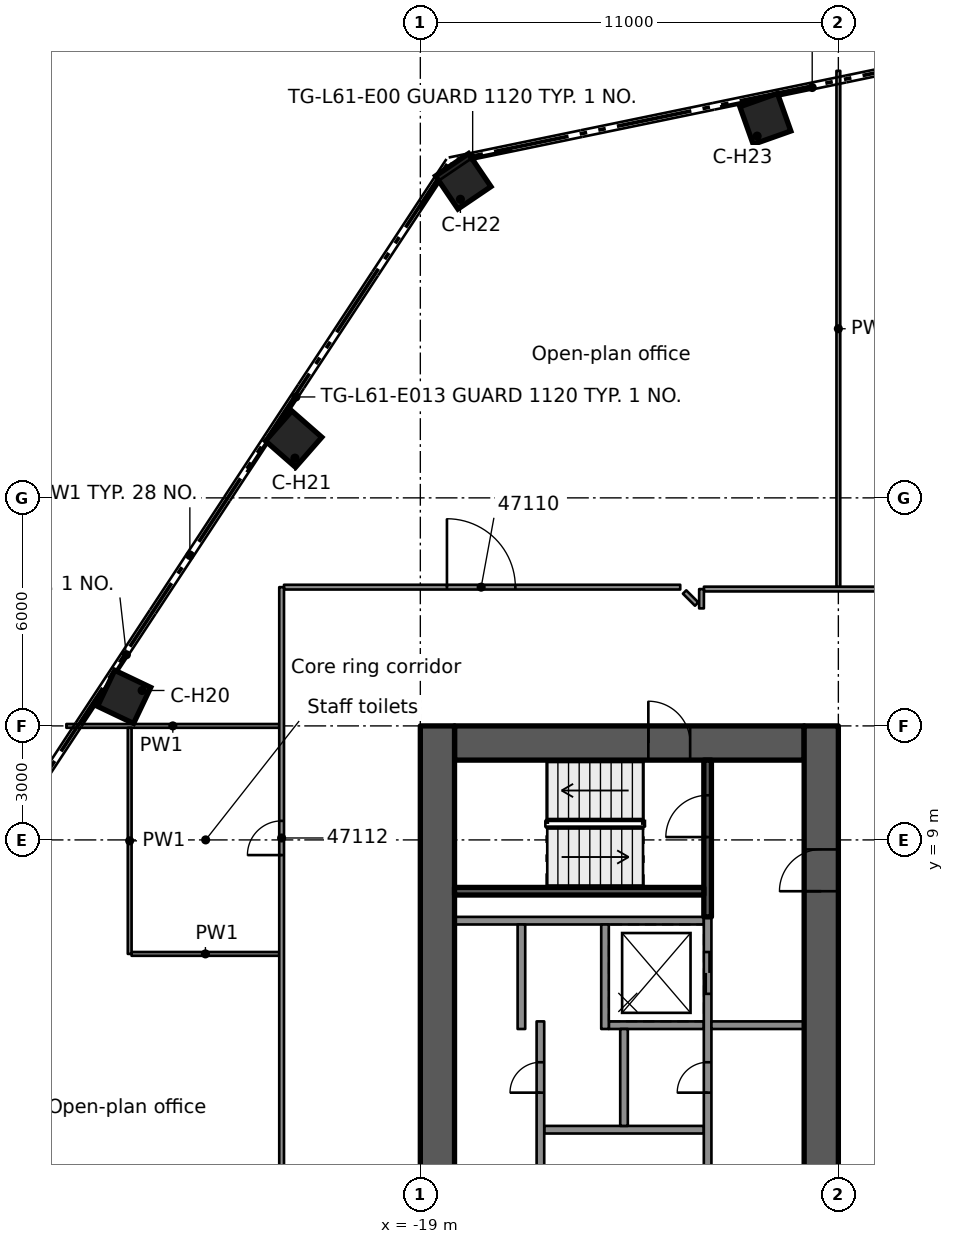
"""IFC4 building model, lengths in metres.
Left out: names, types, materials, properties, quantities, classifications, styles, units other than length and angle.
Written with IfcOpenShell. Run it as: python <this file> out.ifc"""

import sys

from ifc_helpers import new_model, si_unit, direction, frame, frame_2d, origin, origin_2d, place, context, subcontext, project, spatial, rectangle, extrude, element, fill, save


model = new_model("IFC4")
c1 = context("Model", 3, precision=1e-05, world=origin(), true_north=direction((0.0, 1.0)))
c2 = subcontext(c1, "Body", "Model", "MODEL_VIEW")
j1 = project(units=[si_unit("LENGTHUNIT", "METRE"), si_unit("PLANEANGLEUNIT", "RADIAN")], contexts=[c1])
p1 = place(None, origin())
s1 = spatial("IfcSite", under=j1, at=p1, CompositionType="ELEMENT")
p2 = place(p1, origin())
s2 = spatial("IfcBuilding", under=s1, at=p2, CompositionType="ELEMENT")
p3 = place(p2, frame((0.0, 0.0, 232.0)))
s3 = spatial("IfcBuildingStorey", under=s2, at=p3, CompositionType="ELEMENT", Elevation=232.0)
p4 = place(p3, frame((-18.1, 11.55, 0.0), z_axis=(0.0, 0.0, 1.0), x_axis=(1.0, 0.0, 0.0)))
e1 = element("IfcWall", 1, at=p4, inside=s3, PredefinedType="SHEAR", context=c2, shape_type="SweptSolid", body=[
    extrude(rectangle(XDim=9.2, YDim=0.9, at=frame_2d((4.6, 0.0))), origin(), (0.0, 0.0, 1.0), 3.5),
])
p5 = place(p4, frame((5.1, 0.0, 0.0)))
e2 = element("IfcOpeningElement", 2, at=p5, cuts=e1, PredefinedType="OPENING", context=c2, shape_type="SweptSolid", body=[
    extrude(rectangle(XDim=1.1, YDim=2.1, at=frame_2d((0.55, 1.05))), frame((0.0, 0.46, 0.0), z_axis=(0.0, -1.0, 0.0), x_axis=(1.0, 0.0, 0.0)), (0.0, 0.0, 1.0), 0.92),
])
p6 = place(p3, frame((-18.55, -12.0, 0.0), z_axis=(0.0, 0.0, 1.0), x_axis=(0.0, 1.0, 0.0)))
e3 = element("IfcWall", 3, at=p6, inside=s3, PredefinedType="SHEAR", context=c2, shape_type="SweptSolid", body=[
    extrude(rectangle(XDim=24.0, YDim=0.9, at=frame_2d((12.0, 0.0))), origin(), (0.0, 0.0, 1.0), 3.5),
])
p7 = place(p6, frame((10.1, 0.0, 0.0)))
e4 = element("IfcOpeningElement", 4, at=p7, cuts=e3, PredefinedType="OPENING", context=c2, shape_type="SweptSolid", body=[
    extrude(rectangle(XDim=1.8, YDim=2.1, at=frame_2d((0.9, 1.05))), frame((0.0, 0.46, 0.0), z_axis=(0.0, -1.0, 0.0), x_axis=(1.0, 0.0, 0.0)), (0.0, 0.0, 1.0), 0.92),
])
p8 = place(p3, frame((-8.45, -12.0, 0.0), z_axis=(0.0, 0.0, 1.0), x_axis=(0.0, 1.0, 0.0)))
e5 = element("IfcWall", 5, at=p8, inside=s3, PredefinedType="SHEAR", context=c2, shape_type="SweptSolid", body=[
    extrude(rectangle(XDim=24.0, YDim=0.9, at=frame_2d((12.0, 0.0))), origin(), (0.0, 0.0, 1.0), 3.5),
])
p9 = place(p8, frame((9.6, 0.0, 0.0)))
e6 = element("IfcOpeningElement", 6, at=p9, cuts=e5, PredefinedType="OPENING", context=c2, shape_type="SweptSolid", body=[
    extrude(rectangle(XDim=1.8, YDim=2.1, at=frame_2d((0.9, 1.05))), frame((0.0, 0.46, 0.0), z_axis=(0.0, -1.0, 0.0), x_axis=(1.0, 0.0, 0.0)), (0.0, 0.0, 1.0), 0.92),
])
p10 = place(p8, frame((19.65, 0.0, 0.0)))
e7 = element("IfcOpeningElement", 7, at=p10, cuts=e5, PredefinedType="OPENING", context=c2, shape_type="SweptSolid", body=[
    extrude(rectangle(XDim=1.1, YDim=2.1, at=frame_2d((0.55, 1.05))), frame((0.0, 0.46, 0.0), z_axis=(0.0, -1.0, 0.0), x_axis=(1.0, 0.0, 0.0)), (0.0, 0.0, 1.0), 0.92),
])
p11 = place(p8, frame((2.2, 0.0, 0.0)))
e8 = element("IfcOpeningElement", 8, at=p11, cuts=e5, PredefinedType="OPENING", context=c2, shape_type="SweptSolid", body=[
    extrude(rectangle(XDim=0.8, YDim=2.1, at=frame_2d((0.4, 1.05))), frame((0.0, 0.46, 0.0), z_axis=(0.0, -1.0, 0.0), x_axis=(1.0, 0.0, 0.0)), (0.0, 0.0, 1.0), 0.92),
])
for number, where, z_axis, x_axis in (
    (9, (-26.794, 12.764, 0.0), (0.0, 0.0, 1.0), (-0.903, 0.43, 0.0)),
    (10, (-22.333, 19.547, 0.0), (0.0, 0.0, 1.0), (-0.752, 0.659, 0.0)),
    (11, (-17.871, 26.33, 0.0), (0.0, 0.0, 1.0), (-0.562, 0.827, 0.0)),
    (12, (-9.921, 27.972, 0.0), (0.0, 0.0, 1.0), (-0.334, 0.942, 0.0)),
):
    element("IfcColumn", number, at=place(p3, frame(where, z_axis=z_axis, x_axis=x_axis)), inside=s3, PredefinedType="COLUMN", context=c2, shape_type="SweptSolid", body=[
        extrude(rectangle(XDim=1.05, YDim=1.05, at=origin_2d()), origin(), (0.0, 0.0, 1.0), 3.5),
    ])
p12 = place(p3, frame((-11.54, 6.875, 0.0), z_axis=(0.0, 0.0, 1.0), x_axis=(-1.0, 0.0, 0.0)))
e13 = element("IfcWall", 13, at=p12, inside=s3, PredefinedType="SOLIDWALL", context=c2, shape_type="SweptSolid", body=[
    extrude(rectangle(XDim=6.56, YDim=0.2, at=frame_2d((3.28, 0.0))), origin(), (0.0, 0.0, 1.0), 3.09),
])
p13 = place(p3, frame((-11.54, 1.375, 0.0), z_axis=(0.0, 0.0, 1.0), x_axis=(-1.0, 0.0, 0.0)))
e14 = element("IfcWall", 14, at=p13, inside=s3, PredefinedType="SOLIDWALL", context=c2, shape_type="SweptSolid", body=[
    extrude(rectangle(XDim=4.2, YDim=0.2, at=frame_2d((2.1, 0.0))), origin(), (0.0, 0.0, 1.0), 3.09),
])
p14 = place(p3, frame((-11.54, 4.125, 0.0), z_axis=(0.0, 0.0, 1.0), x_axis=(-1.0, 0.0, 0.0)))
e15 = element("IfcWall", 15, at=p14, inside=s3, PredefinedType="SOLIDWALL", context=c2, shape_type="SweptSolid", body=[
    extrude(rectangle(XDim=2.5, YDim=0.2, at=frame_2d((1.25, 0.0))), origin(), (0.0, 0.0, 1.0), 3.09),
])
p15 = place(p3, frame((-11.44, -6.975, 0.0), z_axis=(0.0, 0.0, 1.0), x_axis=(0.0, 1.0, 0.0)))
e16 = element("IfcWall", 16, at=p15, inside=s3, PredefinedType="SOLIDWALL", context=c2, shape_type="SweptSolid", body=[
    extrude(rectangle(XDim=13.95, YDim=0.2, at=frame_2d((6.975, 0.0))), origin(), (0.0, 0.0, 1.0), 3.09),
])
p16 = place(p15, frame((0.925, 0.0, 0.0)))
e17 = element("IfcOpeningElement", 17, at=p16, cuts=e16, PredefinedType="OPENING", context=c2, shape_type="SweptSolid", body=[
    extrude(rectangle(XDim=1.1, YDim=2.1, at=frame_2d((0.55, 1.05))), frame((0.0, 0.11, 0.0), z_axis=(0.0, -1.0, 0.0), x_axis=(1.0, 0.0, 0.0)), (0.0, 0.0, 1.0), 0.22),
])
p17 = place(p15, frame((3.675, 0.0, 0.0)))
e18 = element("IfcOpeningElement", 18, at=p17, cuts=e16, PredefinedType="OPENING", context=c2, shape_type="SweptSolid", body=[
    extrude(rectangle(XDim=1.1, YDim=2.1, at=frame_2d((0.55, 1.05))), frame((0.0, 0.11, 0.0), z_axis=(0.0, -1.0, 0.0), x_axis=(1.0, 0.0, 0.0)), (0.0, 0.0, 1.0), 0.22),
])
p18 = place(p15, frame((11.925, 0.0, 0.0)))
e19 = element("IfcOpeningElement", 19, at=p18, cuts=e16, PredefinedType="OPENING", context=c2, shape_type="SweptSolid", body=[
    extrude(rectangle(XDim=1.1, YDim=2.1, at=frame_2d((0.55, 1.05))), frame((0.0, 0.11, 0.0), z_axis=(0.0, -1.0, 0.0), x_axis=(1.0, 0.0, 0.0)), (0.0, 0.0, 1.0), 0.22),
])
p19 = place(p15, frame((6.575, 0.0, 0.0)))
e20 = element("IfcOpeningElement", 20, at=p19, cuts=e16, PredefinedType="OPENING", context=c2, shape_type="SweptSolid", body=[
    extrude(rectangle(XDim=0.8, YDim=2.1, at=frame_2d((0.4, 1.05))), frame((0.0, 0.11, 0.0), z_axis=(0.0, -1.0, 0.0), x_axis=(1.0, 0.0, 0.0)), (0.0, 0.0, 1.0), 0.22),
])
p20 = place(p15, frame((9.325, 0.0, 0.0)))
e21 = element("IfcOpeningElement", 21, at=p20, cuts=e16, PredefinedType="OPENING", context=c2, shape_type="SweptSolid", body=[
    extrude(rectangle(XDim=0.8, YDim=2.1, at=frame_2d((0.4, 1.05))), frame((0.0, 0.11, 0.0), z_axis=(0.0, -1.0, 0.0), x_axis=(1.0, 0.0, 0.0)), (0.0, 0.0, 1.0), 0.22),
])
p21 = place(p3, frame((-13.64, 1.475, 0.0), z_axis=(0.0, 0.0, 1.0), x_axis=(0.0, 1.0, 0.0)))
e22 = element("IfcWall", 22, at=p21, inside=s3, PredefinedType="SOLIDWALL", context=c2, shape_type="SweptSolid", body=[
    extrude(rectangle(XDim=2.55, YDim=0.2, at=frame_2d((1.275, 0.0))), origin(), (0.0, 0.0, 1.0), 3.09),
])
p22 = place(p3, frame((-14.14, 4.025, 0.0), z_axis=(0.0, 0.0, 1.0), x_axis=(0.0, 1.0, 0.0)))
e23 = element("IfcWall", 23, at=p22, inside=s3, PredefinedType="SOLIDWALL", context=c2, shape_type="SweptSolid", body=[
    extrude(rectangle(XDim=2.75, YDim=0.2, at=frame_2d((1.375, 0.0))), origin(), (0.0, 0.0, 1.0), 3.09),
])
p23 = place(p3, frame((-15.84, -4.025, 0.0), z_axis=(0.0, 0.0, 1.0), x_axis=(0.0, 1.0, 0.0)))
e24 = element("IfcWall", 24, at=p23, inside=s3, PredefinedType="SOLIDWALL", context=c2, shape_type="SweptSolid", body=[
    extrude(rectangle(XDim=8.25, YDim=0.2, at=frame_2d((4.125, 0.0))), origin(), (0.0, 0.0, 1.0), 3.09),
])
p24 = place(p23, frame((6.375, 0.0, 0.0)))
e25 = element("IfcOpeningElement", 25, at=p24, cuts=e24, PredefinedType="OPENING", context=c2, shape_type="SweptSolid", body=[
    extrude(rectangle(XDim=0.8, YDim=2.1, at=frame_2d((0.4, 1.05))), frame((0.0, 0.11, 0.0), z_axis=(0.0, -1.0, 0.0), x_axis=(1.0, 0.0, 0.0)), (0.0, 0.0, 1.0), 0.22),
])
p25 = place(p3, frame((-16.34, 4.025, 0.0), z_axis=(0.0, 0.0, 1.0), x_axis=(0.0, 1.0, 0.0)))
e26 = element("IfcWall", 26, at=p25, inside=s3, PredefinedType="SOLIDWALL", context=c2, shape_type="SweptSolid", body=[
    extrude(rectangle(XDim=2.75, YDim=0.2, at=frame_2d((1.375, 0.0))), origin(), (0.0, 0.0, 1.0), 3.09),
])
p26 = place(p3, frame((-11.44, 6.975, 0.0), z_axis=(0.0, 0.0, 1.0), x_axis=(0.0, 1.0, 0.0)))
e27 = element("IfcWall", 27, at=p26, inside=s3, PredefinedType="SOLIDWALL", context=c2, shape_type="SweptSolid", body=[
    extrude(rectangle(XDim=4.125, YDim=0.2, at=frame_2d((2.062, 0.0))), origin(), (0.0, 0.0, 1.0), 3.09),
])
p27 = place(p26, frame((2.1, 0.0, 0.0)))
e28 = element("IfcOpeningElement", 28, at=p27, cuts=e27, PredefinedType="OPENING", context=c2, shape_type="SweptSolid", body=[
    extrude(rectangle(XDim=1.1, YDim=2.1, at=frame_2d((0.55, 1.05))), frame((0.0, 0.11, 0.0), z_axis=(0.0, -1.0, 0.0), x_axis=(1.0, 0.0, 0.0)), (0.0, 0.0, 1.0), 0.22),
])
p28 = place(p3, frame((-11.54, 7.65, 0.0), z_axis=(0.0, 0.0, 1.0), x_axis=(-1.0, 0.0, 0.0)))
e29 = element("IfcWall", 29, at=p28, inside=s3, PredefinedType="SOLIDWALL", context=c2, shape_type="SweptSolid", body=[
    extrude(rectangle(XDim=6.56, YDim=0.2, at=frame_2d((3.28, 0.0))), origin(), (0.0, 0.0, 1.0), 3.09),
])
p29 = place(p3, frame((-8.9, 4.125, 0.0), z_axis=(0.0, 0.0, 1.0), x_axis=(-1.0, 0.0, 0.0)))
e30 = element("IfcWall", 30, at=p29, inside=s3, PredefinedType="PARTITIONING", context=c2, shape_type="SweptSolid", body=[
    extrude(rectangle(XDim=2.44, YDim=0.2, at=frame_2d((1.22, 0.0))), origin(), (0.0, 0.0, 1.0), 3.09),
])
p30 = place(p3, frame((-12.046, 15.523, 0.0), z_axis=(0.0, 0.0, 1.0), x_axis=(0.707106781187, -0.707106781187, 0.0)))
e31 = element("IfcWall", 31, at=p30, inside=s3, PredefinedType="PARTITIONING", context=c2, shape_type="SweptSolid", body=[
    extrude(rectangle(XDim=0.448, YDim=0.125, at=frame_2d((0.224, 0.0))), origin(), (0.0, 0.0, 1.0), 3.08),
])
p31 = place(p3, frame((-26.598, 6.001, 0.0), z_axis=(0.0, 0.0, 1.0), x_axis=(1.0, 0.0, 0.0)))
e32 = element("IfcWall", 32, at=p31, inside=s3, PredefinedType="PARTITIONING", context=c2, shape_type="SweptSolid", body=[
    extrude(rectangle(XDim=3.886, YDim=0.1, at=frame_2d((1.943, 0.0))), origin(), (0.0, 0.0, 1.0), 3.08),
])
p32 = place(p3, frame((-28.314, 12.0, 0.0), z_axis=(0.0, 0.0, 1.0), x_axis=(1.0, 0.0, 0.0)))
e33 = element("IfcWall", 33, at=p32, inside=s3, PredefinedType="PARTITIONING", context=c2, shape_type="SweptSolid", body=[
    extrude(rectangle(XDim=5.602, YDim=0.1, at=frame_2d((2.801, 0.0))), origin(), (0.0, 0.0, 1.0), 3.08),
])
p33 = place(p3, frame((-11.537, 15.601, 0.0), z_axis=(0.0, 0.0, 1.0), x_axis=(1.0, 0.0, 0.0)))
e34 = element("IfcWall", 34, at=p33, inside=s3, PredefinedType="PARTITIONING", context=c2, shape_type="SweptSolid", body=[
    extrude(rectangle(XDim=23.074, YDim=0.125, at=frame_2d((11.537, 0.0))), origin(), (0.0, 0.0, 1.0), 3.08),
])
p34 = place(p33, frame((9.387, 0.0, 0.0)))
e35 = element("IfcOpeningElement", 35, at=p34, cuts=e34, PredefinedType="OPENING", context=c2, shape_type="SweptSolid", body=[
    extrude(rectangle(XDim=1.8, YDim=2.1, at=frame_2d((0.9, 1.05))), frame((0.0, 0.073, 0.0), z_axis=(0.0, -1.0, 0.0), x_axis=(1.0, 0.0, 0.0)), (0.0, 0.0, 1.0), 0.145),
])
p35 = place(p33, frame((19.487, 0.0, 0.0)))
e36 = element("IfcOpeningElement", 36, at=p35, cuts=e34, PredefinedType="OPENING", context=c2, shape_type="SweptSolid", body=[
    extrude(rectangle(XDim=1.1, YDim=2.1, at=frame_2d((0.55, 1.05))), frame((0.0, 0.073, 0.0), z_axis=(0.0, -1.0, 0.0), x_axis=(1.0, 0.0, 0.0)), (0.0, 0.0, 1.0), 0.145),
])
p36 = place(p3, frame((-22.587, 15.651, 0.0), z_axis=(0.0, 0.0, 1.0), x_axis=(1.0, 0.0, 0.0)))
e37 = element("IfcWall", 37, at=p36, inside=s3, PredefinedType="PARTITIONING", context=c2, shape_type="SweptSolid", body=[
    extrude(rectangle(XDim=10.426, YDim=0.125, at=frame_2d((5.213, 0.0))), origin(), (0.0, 0.0, 1.0), 3.08),
])
p37 = place(p36, frame((4.288, 0.0, 0.0)))
e38 = element("IfcOpeningElement", 38, at=p37, cuts=e37, PredefinedType="OPENING", context=c2, shape_type="SweptSolid", body=[
    extrude(rectangle(XDim=1.8, YDim=2.1, at=frame_2d((0.9, 1.05))), frame((0.0, 0.073, 0.0), z_axis=(0.0, -1.0, 0.0), x_axis=(1.0, 0.0, 0.0)), (0.0, 0.0, 1.0), 0.145),
])
p38 = place(p3, frame((-11.601, 15.092, 0.0), z_axis=(0.0, 0.0, 1.0), x_axis=(0.00192214926, 0.999998152669, 0.0)))
e39 = element("IfcWall", 39, at=p38, inside=s3, PredefinedType="PARTITIONING", context=c2, shape_type="SweptSolid", body=[
    extrude(rectangle(XDim=0.508, YDim=0.125, at=frame_2d((0.254, 0.0))), origin(), (0.0, 0.0, 1.0), 3.08),
])
p39 = place(p3, frame((-8.0, 15.664, 0.0), z_axis=(0.0, 0.0, 1.0), x_axis=(0.0, 1.0, 0.0)))
e40 = element("IfcWall", 40, at=p39, inside=s3, PredefinedType="PARTITIONING", context=c2, shape_type="SweptSolid", body=[
    extrude(rectangle(XDim=13.572, YDim=0.1, at=frame_2d((6.786, 0.0))), origin(), (0.0, 0.0, 1.0), 3.08),
])
p40 = place(p3, frame((-22.65, -15.651, 0.0), z_axis=(0.0, 0.0, 1.0), x_axis=(0.0, 1.0, 0.0)))
e41 = element("IfcWall", 41, at=p40, inside=s3, PredefinedType="PARTITIONING", context=c2, shape_type="SweptSolid", body=[
    extrude(rectangle(XDim=31.302, YDim=0.125, at=frame_2d((15.651, 0.0))), origin(), (0.0, 0.0, 1.0), 3.08),
])
p41 = place(p40, frame((11.751, 0.0, 0.0)))
e42 = element("IfcOpeningElement", 42, at=p41, cuts=e41, PredefinedType="OPENING", context=c2, shape_type="SweptSolid", body=[
    extrude(rectangle(XDim=1.8, YDim=2.1, at=frame_2d((0.9, 1.05))), frame((0.0, 0.073, 0.0), z_axis=(0.0, -1.0, 0.0), x_axis=(1.0, 0.0, 0.0)), (0.0, 0.0, 1.0), 0.145),
])
p42 = place(p40, frame((24.252, 0.0, 0.0)))
e43 = element("IfcOpeningElement", 43, at=p42, cuts=e41, PredefinedType="OPENING", context=c2, shape_type="SweptSolid", body=[
    extrude(rectangle(XDim=0.9, YDim=2.1, at=frame_2d((0.45, 1.05))), frame((0.0, 0.073, 0.0), z_axis=(0.0, -1.0, 0.0), x_axis=(1.0, 0.0, 0.0)), (0.0, 0.0, 1.0), 0.145),
])
p43 = place(p3, frame((-26.648, 6.001, 0.0), z_axis=(0.0, 0.0, 1.0), x_axis=(0.0, 1.0, 0.0)))
e44 = element("IfcWall", 44, at=p43, inside=s3, PredefinedType="PARTITIONING", context=c2, shape_type="SweptSolid", body=[
    extrude(rectangle(XDim=5.949, YDim=0.1, at=frame_2d((2.975, 0.0))), origin(), (0.0, 0.0, 1.0), 3.08),
])
p44 = place(p18, origin())
e45 = element("IfcDoor", 45, at=p44, inside=s3, OperationType="DOUBLE_DOOR_SLIDING", PredefinedType="DOOR", context=c2, shape_type="SweptSolid", body=[
    extrude(rectangle(XDim=1.1, YDim=2.1, at=frame_2d((0.55, 1.05))), frame((0.0, 0.025, 0.0), z_axis=(0.0, -1.0, 0.0), x_axis=(1.0, 0.0, 0.0)), (0.0, 0.0, 1.0), 0.05),
])
fill(e19, e45)
p45 = place(p20, origin())
e46 = element("IfcDoor", 46, at=p45, inside=s3, OperationType="SINGLE_SWING_LEFT", PredefinedType="DOOR", context=c2, shape_type="SweptSolid", body=[
    extrude(rectangle(XDim=0.8, YDim=2.1, at=frame_2d((0.4, 1.05))), frame((0.0, 0.025, 0.0), z_axis=(0.0, -1.0, 0.0), x_axis=(1.0, 0.0, 0.0)), (0.0, 0.0, 1.0), 0.05),
])
fill(e21, e46)
p46 = place(p24, origin())
e47 = element("IfcDoor", 47, at=p46, inside=s3, OperationType="SINGLE_SWING_LEFT", PredefinedType="DOOR", context=c2, shape_type="SweptSolid", body=[
    extrude(rectangle(XDim=0.8, YDim=2.1, at=frame_2d((0.4, 1.05))), frame((0.0, 0.025, 0.0), z_axis=(0.0, -1.0, 0.0), x_axis=(1.0, 0.0, 0.0)), (0.0, 0.0, 1.0), 0.05),
])
fill(e25, e47)
p47 = place(p10, origin())
e48 = element("IfcDoor", 48, at=p47, inside=s3, OperationType="SINGLE_SWING_RIGHT", PredefinedType="DOOR", context=c2, shape_type="SweptSolid", body=[
    extrude(rectangle(XDim=1.1, YDim=2.1, at=frame_2d((0.55, 1.05))), frame((0.0, 0.025, 0.0), z_axis=(0.0, -1.0, 0.0), x_axis=(1.0, 0.0, 0.0)), (0.0, 0.0, 1.0), 0.05),
])
fill(e7, e48)
p48 = place(p5, origin())
e49 = element("IfcDoor", 49, at=p48, inside=s3, OperationType="SINGLE_SWING_RIGHT", PredefinedType="DOOR", context=c2, shape_type="SweptSolid", body=[
    extrude(rectangle(XDim=1.1, YDim=2.1, at=frame_2d((0.55, 1.05))), frame((0.0, 0.025, 0.0), z_axis=(0.0, -1.0, 0.0), x_axis=(1.0, 0.0, 0.0)), (0.0, 0.0, 1.0), 0.05),
])
fill(e2, e49)
p49 = place(p27, origin())
e50 = element("IfcDoor", 50, at=p49, inside=s3, OperationType="SINGLE_SWING_RIGHT", PredefinedType="DOOR", context=c2, shape_type="SweptSolid", body=[
    extrude(rectangle(XDim=1.1, YDim=2.1, at=frame_2d((0.55, 1.05))), frame((0.0, 0.025, 0.0), z_axis=(0.0, -1.0, 0.0), x_axis=(1.0, 0.0, 0.0)), (0.0, 0.0, 1.0), 0.05),
])
fill(e28, e50)
p50 = place(p37, origin())
e51 = element("IfcDoor", 51, at=p50, inside=s3, OperationType="DOUBLE_DOOR_SINGLE_SWING", PredefinedType="DOOR", context=c2, shape_type="SweptSolid", body=[
    extrude(rectangle(XDim=1.8, YDim=2.1, at=frame_2d((0.9, 1.05))), frame((0.0, 0.025, 0.0), z_axis=(0.0, -1.0, 0.0), x_axis=(1.0, 0.0, 0.0)), (0.0, 0.0, 1.0), 0.05),
])
fill(e38, e51)
p51 = place(p42, origin())
e52 = element("IfcDoor", 52, at=p51, inside=s3, OperationType="SINGLE_SWING_RIGHT", PredefinedType="DOOR", context=c2, shape_type="SweptSolid", body=[
    extrude(rectangle(XDim=0.9, YDim=2.1, at=frame_2d((0.45, 1.05))), frame((0.0, 0.025, 0.0), z_axis=(0.0, -1.0, 0.0), x_axis=(1.0, 0.0, 0.0)), (0.0, 0.0, 1.0), 0.05),
])
fill(e43, e52)
save(model, sys.argv[1])
